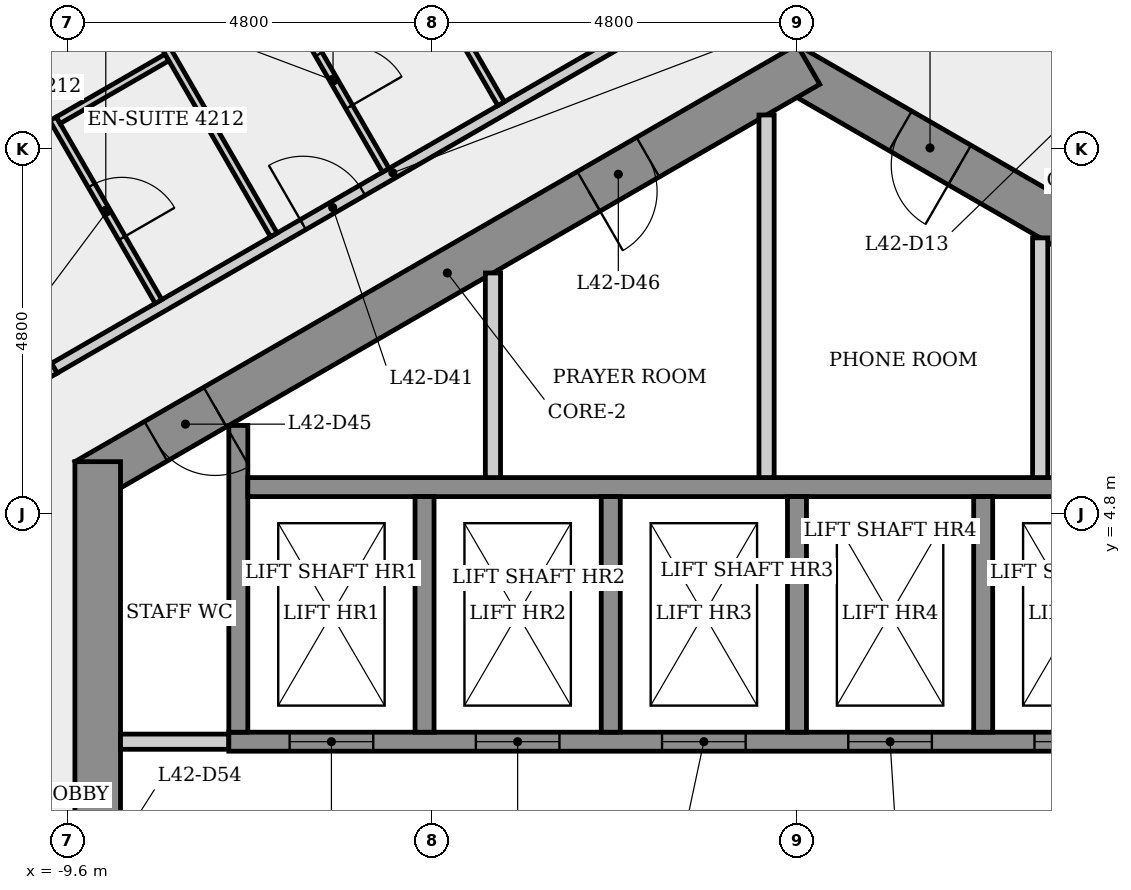
"""IFC4 building model, lengths in metres.
Left out: names, types, materials, properties, quantities, classifications, styles, units other than length and angle.
Written with IfcOpenShell. Run it as: python <this file> out.ifc"""

import sys

from ifc_helpers import new_model, si_unit, direction, frame, frame_2d, origin, place, context, subcontext, project, spatial, rectangle, extrude, element, fill, save


model = new_model("IFC4")
c1 = context("Model", 3, precision=1e-05, world=origin(), true_north=direction((0.0, 1.0)))
c2 = subcontext(c1, "Body", "Model", "MODEL_VIEW")
j1 = project(units=[si_unit("LENGTHUNIT", "METRE"), si_unit("PLANEANGLEUNIT", "RADIAN")], contexts=[c1])
p1 = place(None, origin())
s1 = spatial("IfcSite", under=j1, at=p1, CompositionType="ELEMENT")
p2 = place(p1, origin())
s2 = spatial("IfcBuilding", under=s1, at=p2, CompositionType="ELEMENT")
p3 = place(p2, frame((0.0, 0.0, 159.5)))
s3 = spatial("IfcBuildingStorey", under=s2, at=p3, CompositionType="ELEMENT", Elevation=159.5)
p4 = place(p3, frame((9.35, 5.225, 0.0), z_axis=(0.0, 0.0, 1.0), x_axis=(-0.866023993627, 0.500002442456, 0.0)))
e1 = element("IfcWall", 1, at=p4, inside=s3, PredefinedType="SHEAR", context=c2, shape_type="SweptSolid", body=[
    extrude(rectangle(XDim=10.97, YDim=0.6, at=frame_2d((5.485, 0.0))), origin(), (0.0, 0.0, 1.0), 3.4),
])
p5 = place(p4, frame((8.325, 0.0, 0.0)))
e2 = element("IfcOpeningElement", 2, at=p5, cuts=e1, PredefinedType="OPENING", context=c2, shape_type="SweptSolid", body=[
    extrude(rectangle(XDim=0.9, YDim=2.1, at=frame_2d((0.45, 1.05))), frame((0.0, 0.31, 0.0), z_axis=(0.0, -1.0, 0.0), x_axis=(1.0, 0.0, 0.0)), (0.0, 0.0, 1.0), 0.62),
])
p6 = place(p4, frame((1.518, 0.0, 0.0)))
e3 = element("IfcOpeningElement", 3, at=p6, cuts=e1, PredefinedType="OPENING", context=c2, shape_type="SweptSolid", body=[
    extrude(rectangle(XDim=0.9, YDim=2.1, at=frame_2d((0.45, 1.05))), frame((0.0, 0.31, 0.0), z_axis=(0.0, -1.0, 0.0), x_axis=(1.0, 0.0, 0.0)), (0.0, 0.0, 1.0), 0.62),
])
p7 = place(p3, frame((0.15, 10.71, 0.0), z_axis=(0.0, 0.0, 1.0), x_axis=(-0.866023993627, -0.500002442456, 0.0)))
e4 = element("IfcWall", 4, at=p7, inside=s3, PredefinedType="SHEAR", context=c2, shape_type="SweptSolid", body=[
    extrude(rectangle(XDim=10.97, YDim=0.6, at=frame_2d((5.485, 0.0))), origin(), (0.0, 0.0, 1.0), 3.4),
])
p8 = place(p7, frame((9.013, 0.0, 0.0)))
e5 = element("IfcOpeningElement", 5, at=p8, cuts=e4, PredefinedType="OPENING", context=c2, shape_type="SweptSolid", body=[
    extrude(rectangle(XDim=0.9, YDim=2.1, at=frame_2d((0.45, 1.05))), frame((0.0, 0.31, 0.0), z_axis=(0.0, -1.0, 0.0), x_axis=(1.0, 0.0, 0.0)), (0.0, 0.0, 1.0), 0.62),
])
p9 = place(p7, frame((2.437, 0.0, 0.0)))
e6 = element("IfcOpeningElement", 6, at=p9, cuts=e4, PredefinedType="OPENING", context=c2, shape_type="SweptSolid", body=[
    extrude(rectangle(XDim=0.9, YDim=2.1, at=frame_2d((0.45, 1.05))), frame((0.0, 0.31, 0.0), z_axis=(0.0, -1.0, 0.0), x_axis=(1.0, 0.0, 0.0)), (0.0, 0.0, 1.0), 0.62),
])
p10 = place(p3, frame((-9.2, 5.485, 0.0), z_axis=(0.0, 0.0, 1.0), x_axis=(0.0, -1.0, 0.0)))
e7 = element("IfcWall", 7, at=p10, inside=s3, PredefinedType="SHEAR", context=c2, shape_type="SweptSolid", body=[
    extrude(rectangle(XDim=10.97, YDim=0.6, at=frame_2d((5.485, 0.0))), origin(), (0.0, 0.0, 1.0), 3.4),
])
p11 = place(p10, frame((8.516, 0.0, 0.0)))
e8 = element("IfcOpeningElement", 8, at=p11, cuts=e7, PredefinedType="OPENING", context=c2, shape_type="SweptSolid", body=[
    extrude(rectangle(XDim=0.9, YDim=2.1, at=frame_2d((0.45, 1.05))), frame((0.0, 0.31, 0.0), z_axis=(0.0, -1.0, 0.0), x_axis=(1.0, 0.0, 0.0)), (0.0, 0.0, 1.0), 0.62),
])
p12 = place(p10, frame((4.685, 0.0, 0.0)))
e9 = element("IfcOpeningElement", 9, at=p12, cuts=e7, PredefinedType="OPENING", context=c2, shape_type="SweptSolid", body=[
    extrude(rectangle(XDim=1.6, YDim=2.1, at=frame_2d((0.8, 1.05))), frame((0.0, 0.31, 0.0), z_axis=(0.0, -1.0, 0.0), x_axis=(1.0, 0.0, 0.0)), (0.0, 0.0, 1.0), 0.62),
])
p13 = place(p3, frame((-12.344, 11.024, 0.0), z_axis=(0.0, 0.0, 1.0), x_axis=(0.50001008724, -0.866019579835, 0.0)))
e10 = element("IfcWall", 10, at=p13, inside=s3, PredefinedType="PARTITIONING", context=c2, shape_type="SweptSolid", body=[
    extrude(rectangle(XDim=5.094, YDim=0.15, at=frame_2d((2.547, 0.0))), origin(), (0.0, 0.0, 1.0), 3.05),
])
p14 = place(p13, frame((2.06, 0.0, 0.0)))
e11 = element("IfcOpeningElement", 11, at=p14, cuts=e10, PredefinedType="OPENING", context=c2, shape_type="SweptSolid", body=[
    extrude(rectangle(XDim=0.9, YDim=2.1, at=frame_2d((0.45, 1.05))), frame((0.0, 0.085, 0.0), z_axis=(0.0, -1.0, 0.0), x_axis=(1.0, 0.0, 0.0)), (0.0, 0.0, 1.0), 0.17),
])
p15 = place(p3, frame((-9.77, 6.715, 0.0), z_axis=(0.0, 0.0, 1.0), x_axis=(0.866022281964, 0.500005407112, 0.0)))
e12 = element("IfcWall", 12, at=p15, inside=s3, PredefinedType="PARTITIONING", context=c2, shape_type="SweptSolid", body=[
    extrude(rectangle(XDim=10.282, YDim=0.15, at=frame_2d((5.141, 0.0))), origin(), (0.0, 0.0, 1.0), 3.05),
])
p16 = place(p15, frame((3.777, 0.0, 0.0)))
e13 = element("IfcOpeningElement", 13, at=p16, cuts=e12, PredefinedType="OPENING", context=c2, shape_type="SweptSolid", body=[
    extrude(rectangle(XDim=0.9, YDim=2.1, at=frame_2d((0.45, 1.05))), frame((0.0, 0.085, 0.0), z_axis=(0.0, -1.0, 0.0), x_axis=(1.0, 0.0, 0.0)), (0.0, 0.0, 1.0), 0.17),
])
p17 = place(p3, frame((-9.788, 9.995, 0.0), z_axis=(0.0, 0.0, 1.0), x_axis=(0.50007530636, -0.865981921271, 0.0)))
e14 = element("IfcWall", 14, at=p17, inside=s3, PredefinedType="PARTITIONING", context=c2, shape_type="SweptSolid", body=[
    extrude(rectangle(XDim=2.775, YDim=0.1, at=frame_2d((1.387, 0.0))), origin(), (0.0, 0.0, 1.0), 3.05),
])
p18 = place(p17, frame((1.012, 0.0, 0.0)))
e15 = element("IfcOpeningElement", 15, at=p18, cuts=e14, PredefinedType="OPENING", context=c2, shape_type="SweptSolid", body=[
    extrude(rectangle(XDim=0.8, YDim=2.1, at=frame_2d((0.4, 1.05))), frame((0.0, 0.06, 0.0), z_axis=(0.0, -1.0, 0.0), x_axis=(1.0, 0.0, 0.0)), (0.0, 0.0, 1.0), 0.12),
])
p19 = place(p3, frame((-8.9, 1.8, 0.0), z_axis=(0.0, 0.0, 1.0), x_axis=(1.0, 0.0, 0.0)))
e16 = element("IfcWall", 16, at=p19, inside=s3, PredefinedType="PARTITIONING", context=c2, shape_type="SweptSolid", body=[
    extrude(rectangle(XDim=1.425, YDim=0.2, at=frame_2d((0.712, 0.0))), origin(), (0.0, 0.0, 1.0), 3.05),
])
p20 = place(p3, frame((-8.288, 10.803, 0.0), z_axis=(0.0, 0.0, 1.0), x_axis=(-0.866052736899, -0.499952654668, 0.0)))
e17 = element("IfcWall", 17, at=p20, inside=s3, PredefinedType="PARTITIONING", context=c2, shape_type="SweptSolid", body=[
    extrude(rectangle(XDim=1.653, YDim=0.1, at=frame_2d((0.826, 0.0))), origin(), (0.0, 0.0, 1.0), 3.05),
])
p21 = place(p3, frame((-10.588, 14.887, 0.0), z_axis=(0.0, 0.0, 1.0), x_axis=(0.499997136009, -0.866027057304, 0.0)))
e18 = element("IfcWall", 18, at=p21, inside=s3, PredefinedType="PARTITIONING", context=c2, shape_type="SweptSolid", body=[
    extrude(rectangle(XDim=7.412, YDim=0.1, at=frame_2d((3.706, 0.0))), origin(), (0.0, 0.0, 1.0), 3.05),
])
p22 = place(p3, frame((-7.475, 1.8, 0.0), z_axis=(0.0, 0.0, 1.0), x_axis=(1.0, 0.0, 0.0)))
e19 = element("IfcWall", 19, at=p22, inside=s3, PredefinedType="SHEAR", context=c2, shape_type="SweptSolid", body=[
    extrude(rectangle(XDim=14.95, YDim=0.25, at=frame_2d((7.475, 0.0))), origin(), (0.0, 0.0, 1.0), 3.05),
])
p23 = place(p22, frame((0.8, 0.0, 0.0)))
e20 = element("IfcOpeningElement", 20, at=p23, cuts=e19, PredefinedType="OPENING", context=c2, shape_type="SweptSolid", body=[
    extrude(rectangle(XDim=1.1, YDim=2.1, at=frame_2d((0.55, 1.05))), frame((0.0, 0.135, 0.0), z_axis=(0.0, -1.0, 0.0), x_axis=(1.0, 0.0, 0.0)), (0.0, 0.0, 1.0), 0.27),
])
p24 = place(p22, frame((3.25, 0.0, 0.0)))
e21 = element("IfcOpeningElement", 21, at=p24, cuts=e19, PredefinedType="OPENING", context=c2, shape_type="SweptSolid", body=[
    extrude(rectangle(XDim=1.1, YDim=2.1, at=frame_2d((0.55, 1.05))), frame((0.0, 0.135, 0.0), z_axis=(0.0, -1.0, 0.0), x_axis=(1.0, 0.0, 0.0)), (0.0, 0.0, 1.0), 0.27),
])
p25 = place(p22, frame((5.7, 0.0, 0.0)))
e22 = element("IfcOpeningElement", 22, at=p25, cuts=e19, PredefinedType="OPENING", context=c2, shape_type="SweptSolid", body=[
    extrude(rectangle(XDim=1.1, YDim=2.1, at=frame_2d((0.55, 1.05))), frame((0.0, 0.135, 0.0), z_axis=(0.0, -1.0, 0.0), x_axis=(1.0, 0.0, 0.0)), (0.0, 0.0, 1.0), 0.27),
])
p26 = place(p22, frame((8.15, 0.0, 0.0)))
e23 = element("IfcOpeningElement", 23, at=p26, cuts=e19, PredefinedType="OPENING", context=c2, shape_type="SweptSolid", body=[
    extrude(rectangle(XDim=1.1, YDim=2.1, at=frame_2d((0.55, 1.05))), frame((0.0, 0.135, 0.0), z_axis=(0.0, -1.0, 0.0), x_axis=(1.0, 0.0, 0.0)), (0.0, 0.0, 1.0), 0.27),
])
p27 = place(p22, frame((10.6, 0.0, 0.0)))
e24 = element("IfcOpeningElement", 24, at=p27, cuts=e19, PredefinedType="OPENING", context=c2, shape_type="SweptSolid", body=[
    extrude(rectangle(XDim=1.1, YDim=2.1, at=frame_2d((0.55, 1.05))), frame((0.0, 0.135, 0.0), z_axis=(0.0, -1.0, 0.0), x_axis=(1.0, 0.0, 0.0)), (0.0, 0.0, 1.0), 0.27),
])
p28 = place(p22, frame((13.05, 0.0, 0.0)))
e25 = element("IfcOpeningElement", 25, at=p28, cuts=e19, PredefinedType="OPENING", context=c2, shape_type="SweptSolid", body=[
    extrude(rectangle(XDim=1.1, YDim=2.1, at=frame_2d((0.55, 1.05))), frame((0.0, 0.135, 0.0), z_axis=(0.0, -1.0, 0.0), x_axis=(1.0, 0.0, 0.0)), (0.0, 0.0, 1.0), 0.27),
])
p29 = place(p3, frame((-7.35, 1.925, 0.0), z_axis=(0.0, 0.0, 1.0), x_axis=(0.0, 1.0, 0.0)))
e26 = element("IfcWall", 26, at=p29, inside=s3, PredefinedType="SHEAR", context=c2, shape_type="SweptSolid", body=[
    extrude(rectangle(XDim=4.036, YDim=0.25, at=frame_2d((2.018, 0.0))), origin(), (0.0, 0.0, 1.0), 3.05),
])
p30 = place(p3, frame((-7.225, 5.15, 0.0), z_axis=(0.0, 0.0, 1.0), x_axis=(1.0, 0.0, 0.0)))
e27 = element("IfcWall", 27, at=p30, inside=s3, PredefinedType="SHEAR", context=c2, shape_type="SweptSolid", body=[
    extrude(rectangle(XDim=14.7, YDim=0.25, at=frame_2d((7.35, 0.0))), origin(), (0.0, 0.0, 1.0), 3.05),
])
p31 = place(p3, frame((-6.798, 11.722, 0.0), z_axis=(0.0, 0.0, 1.0), x_axis=(0.499971228071, -0.866042014628, 0.0)))
e28 = element("IfcWall", 28, at=p31, inside=s3, PredefinedType="PARTITIONING", context=c2, shape_type="SweptSolid", body=[
    extrude(rectangle(XDim=2.775, YDim=0.1, at=frame_2d((1.388, 0.0))), origin(), (0.0, 0.0, 1.0), 3.05),
])
p32 = place(p31, frame((1.012, 0.0, 0.0)))
e29 = element("IfcOpeningElement", 29, at=p32, cuts=e28, PredefinedType="OPENING", context=c2, shape_type="SweptSolid", body=[
    extrude(rectangle(XDim=0.8, YDim=2.1, at=frame_2d((0.4, 1.05))), frame((0.0, 0.06, 0.0), z_axis=(0.0, -1.0, 0.0), x_axis=(1.0, 0.0, 0.0)), (0.0, 0.0, 1.0), 0.12),
])
p33 = place(p3, frame((-7.598, 16.613, 0.0), z_axis=(0.0, 0.0, 1.0), x_axis=(0.500011399757, -0.866018822032, 0.0)))
e30 = element("IfcWall", 30, at=p33, inside=s3, PredefinedType="PARTITIONING", context=c2, shape_type="SweptSolid", body=[
    extrude(rectangle(XDim=7.411, YDim=0.1, at=frame_2d((3.706, 0.0))), origin(), (0.0, 0.0, 1.0), 3.05),
])
p34 = place(p3, frame((-4.9, 5.025, 0.0), z_axis=(0.0, 0.0, 1.0), x_axis=(0.0, -1.0, 0.0)))
e31 = element("IfcWall", 31, at=p34, inside=s3, PredefinedType="SHEAR", context=c2, shape_type="SweptSolid", body=[
    extrude(rectangle(XDim=3.1, YDim=0.25, at=frame_2d((1.55, 0.0))), origin(), (0.0, 0.0, 1.0), 3.4),
])
p35 = place(p3, frame((-4.0, 7.967, 0.0), z_axis=(0.0, 0.0, 1.0), x_axis=(0.0, -1.0, 0.0)))
e32 = element("IfcWall", 32, at=p35, inside=s3, PredefinedType="PARTITIONING", context=c2, shape_type="SweptSolid", body=[
    extrude(rectangle(XDim=2.692, YDim=0.2, at=frame_2d((1.346, 0.0))), origin(), (0.0, 0.0, 1.0), 3.05),
])
p36 = place(p3, frame((-2.45, 5.025, 0.0), z_axis=(0.0, 0.0, 1.0), x_axis=(0.0, -1.0, 0.0)))
e33 = element("IfcWall", 33, at=p36, inside=s3, PredefinedType="SHEAR", context=c2, shape_type="SweptSolid", body=[
    extrude(rectangle(XDim=3.1, YDim=0.25, at=frame_2d((1.55, 0.0))), origin(), (0.0, 0.0, 1.0), 3.4),
])
p37 = place(p3, frame((-0.4, 10.046, 0.0), z_axis=(0.0, 0.0, 1.0), x_axis=(0.0, -1.0, 0.0)))
e34 = element("IfcWall", 34, at=p37, inside=s3, PredefinedType="PARTITIONING", context=c2, shape_type="SweptSolid", body=[
    extrude(rectangle(XDim=4.771, YDim=0.2, at=frame_2d((2.385, 0.0))), origin(), (0.0, 0.0, 1.0), 3.05),
])
for number, where, z_axis, x_axis in (
    (35, (0.0, 5.025, 0.0), (0.0, 0.0, 1.0), (0.0, -1.0, 0.0)),
    (36, (2.45, 5.025, 0.0), (0.0, 0.0, 1.0), (0.0, -1.0, 0.0)),
):
    element("IfcWall", number, at=place(p3, frame(where, z_axis=z_axis, x_axis=x_axis)), inside=s3, PredefinedType="SHEAR", context=c2, shape_type="SweptSolid", body=[
        extrude(rectangle(XDim=3.1, YDim=0.25, at=frame_2d((1.55, 0.0))), origin(), (0.0, 0.0, 1.0), 3.4),
    ])
p38 = place(p3, frame((3.2, 8.429, 0.0), z_axis=(0.0, 0.0, 1.0), x_axis=(0.0, -1.0, 0.0)))
e37 = element("IfcWall", 37, at=p38, inside=s3, PredefinedType="PARTITIONING", context=c2, shape_type="SweptSolid", body=[
    extrude(rectangle(XDim=3.154, YDim=0.2, at=frame_2d((1.577, 0.0))), origin(), (0.0, 0.0, 1.0), 3.05),
])
p39 = place(p3, frame((6.435, 9.795, 0.0), z_axis=(0.0, 0.0, 1.0), x_axis=(-0.866012907634, 0.500021643343, 0.0)))
e38 = element("IfcWall", 38, at=p39, inside=s3, PredefinedType="PARTITIONING", context=c2, shape_type="SweptSolid", body=[
    extrude(rectangle(XDim=4.45, YDim=0.2, at=frame_2d((2.225, 0.0))), origin(), (0.0, 0.0, 1.0), 3.05),
])
p40 = place(p39, frame((1.675, 0.0, 0.0)))
e39 = element("IfcOpeningElement", 39, at=p40, cuts=e38, PredefinedType="OPENING", context=c2, shape_type="SweptSolid", body=[
    extrude(rectangle(XDim=1.1, YDim=2.1, at=frame_2d((0.55, 1.05))), frame((0.0, 0.11, 0.0), z_axis=(0.0, -1.0, 0.0), x_axis=(1.0, 0.0, 0.0)), (0.0, 0.0, 1.0), 0.22),
])
p41 = place(p23, origin())
e40 = element("IfcDoor", 40, at=p41, inside=s3, OperationType="SLIDING_TO_LEFT", PredefinedType="DOOR", context=c2, shape_type="SweptSolid", body=[
    extrude(rectangle(XDim=1.1, YDim=2.1, at=frame_2d((0.55, 1.05))), frame((0.0, 0.025, 0.0), z_axis=(0.0, -1.0, 0.0), x_axis=(1.0, 0.0, 0.0)), (0.0, 0.0, 1.0), 0.05),
])
fill(e20, e40)
p42 = place(p24, origin())
e41 = element("IfcDoor", 41, at=p42, inside=s3, OperationType="SLIDING_TO_LEFT", PredefinedType="DOOR", context=c2, shape_type="SweptSolid", body=[
    extrude(rectangle(XDim=1.1, YDim=2.1, at=frame_2d((0.55, 1.05))), frame((0.0, 0.025, 0.0), z_axis=(0.0, -1.0, 0.0), x_axis=(1.0, 0.0, 0.0)), (0.0, 0.0, 1.0), 0.05),
])
fill(e21, e41)
p43 = place(p25, origin())
e42 = element("IfcDoor", 42, at=p43, inside=s3, OperationType="SLIDING_TO_LEFT", PredefinedType="DOOR", context=c2, shape_type="SweptSolid", body=[
    extrude(rectangle(XDim=1.1, YDim=2.1, at=frame_2d((0.55, 1.05))), frame((0.0, 0.025, 0.0), z_axis=(0.0, -1.0, 0.0), x_axis=(1.0, 0.0, 0.0)), (0.0, 0.0, 1.0), 0.05),
])
fill(e22, e42)
p44 = place(p26, origin())
e43 = element("IfcDoor", 43, at=p44, inside=s3, OperationType="SLIDING_TO_LEFT", PredefinedType="DOOR", context=c2, shape_type="SweptSolid", body=[
    extrude(rectangle(XDim=1.1, YDim=2.1, at=frame_2d((0.55, 1.05))), frame((0.0, 0.025, 0.0), z_axis=(0.0, -1.0, 0.0), x_axis=(1.0, 0.0, 0.0)), (0.0, 0.0, 1.0), 0.05),
])
fill(e23, e43)
p45 = place(p27, origin())
e44 = element("IfcDoor", 44, at=p45, inside=s3, OperationType="SLIDING_TO_LEFT", PredefinedType="DOOR", context=c2, shape_type="SweptSolid", body=[
    extrude(rectangle(XDim=1.1, YDim=2.1, at=frame_2d((0.55, 1.05))), frame((0.0, 0.025, 0.0), z_axis=(0.0, -1.0, 0.0), x_axis=(1.0, 0.0, 0.0)), (0.0, 0.0, 1.0), 0.05),
])
fill(e24, e44)
p46 = place(p16, origin())
e45 = element("IfcDoor", 45, at=p46, inside=s3, OperationType="SINGLE_SWING_LEFT", PredefinedType="DOOR", context=c2, shape_type="SweptSolid", body=[
    extrude(rectangle(XDim=0.9, YDim=2.1, at=frame_2d((0.45, 1.05))), frame((0.0, 0.025, 0.0), z_axis=(0.0, -1.0, 0.0), x_axis=(1.0, 0.0, 0.0)), (0.0, 0.0, 1.0), 0.05),
])
fill(e13, e45)
p47 = place(p32, origin())
e46 = element("IfcDoor", 46, at=p47, inside=s3, OperationType="SINGLE_SWING_RIGHT", PredefinedType="DOOR", context=c2, shape_type="SweptSolid", body=[
    extrude(rectangle(XDim=0.8, YDim=2.1, at=frame_2d((0.4, 1.05))), frame((0.0, 0.025, 0.0), z_axis=(0.0, -1.0, 0.0), x_axis=(1.0, 0.0, 0.0)), (0.0, 0.0, 1.0), 0.05),
])
fill(e29, e46)
p48 = place(p18, origin())
e47 = element("IfcDoor", 47, at=p48, inside=s3, OperationType="SINGLE_SWING_RIGHT", PredefinedType="DOOR", context=c2, shape_type="SweptSolid", body=[
    extrude(rectangle(XDim=0.8, YDim=2.1, at=frame_2d((0.4, 1.05))), frame((0.0, 0.025, 0.0), z_axis=(0.0, -1.0, 0.0), x_axis=(1.0, 0.0, 0.0)), (0.0, 0.0, 1.0), 0.05),
])
fill(e15, e47)
p49 = place(p8, origin())
e48 = element("IfcDoor", 48, at=p49, inside=s3, OperationType="SINGLE_SWING_LEFT", PredefinedType="DOOR", context=c2, shape_type="SweptSolid", body=[
    extrude(rectangle(XDim=0.9, YDim=2.1, at=frame_2d((0.45, 1.05))), frame((0.0, 0.025, 0.0), z_axis=(0.0, -1.0, 0.0), x_axis=(1.0, 0.0, 0.0)), (0.0, 0.0, 1.0), 0.05),
])
fill(e5, e48)
p50 = place(p9, origin())
e49 = element("IfcDoor", 49, at=p50, inside=s3, OperationType="SINGLE_SWING_RIGHT", PredefinedType="DOOR", context=c2, shape_type="SweptSolid", body=[
    extrude(rectangle(XDim=0.9, YDim=2.1, at=frame_2d((0.45, 1.05))), frame((0.0, 0.025, 0.0), z_axis=(0.0, -1.0, 0.0), x_axis=(1.0, 0.0, 0.0)), (0.0, 0.0, 1.0), 0.05),
])
fill(e6, e49)
p51 = place(p5, origin())
e50 = element("IfcDoor", 50, at=p51, inside=s3, OperationType="SINGLE_SWING_LEFT", PredefinedType="DOOR", context=c2, shape_type="SweptSolid", body=[
    extrude(rectangle(XDim=0.9, YDim=2.1, at=frame_2d((0.45, 1.05))), frame((0.0, 0.025, 0.0), z_axis=(0.0, -1.0, 0.0), x_axis=(1.0, 0.0, 0.0)), (0.0, 0.0, 1.0), 0.05),
])
fill(e2, e50)
save(model, sys.argv[1])
